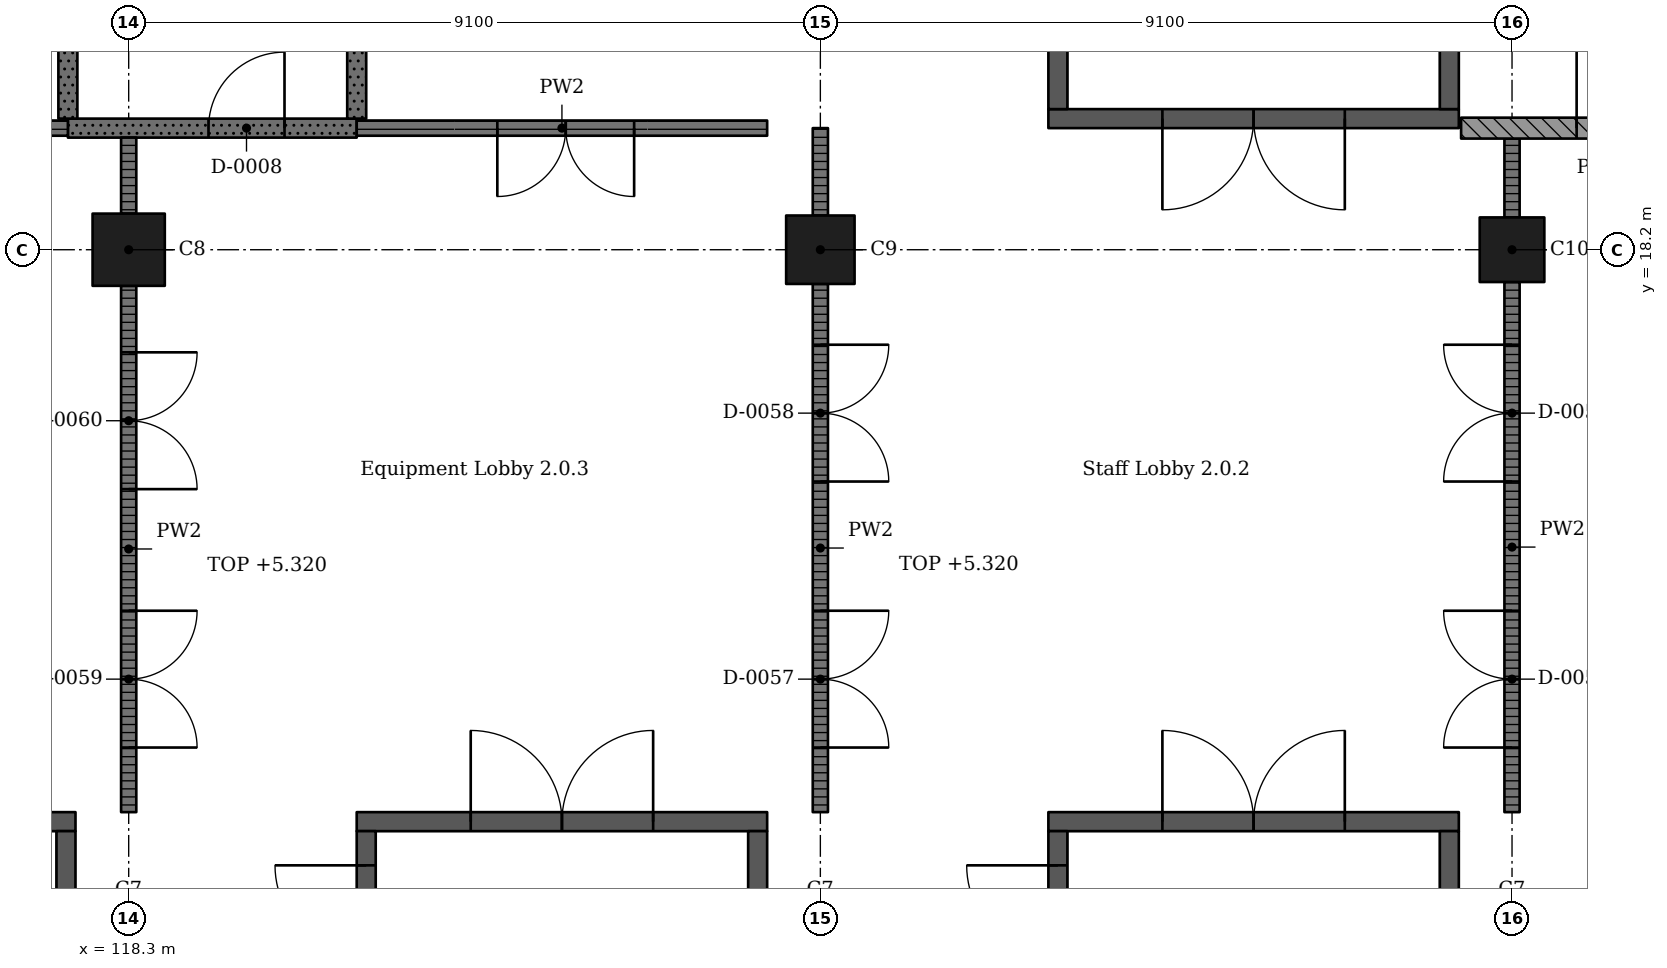
"""IFC4 building model, lengths in metres.
Left out: names, types, materials, properties, quantities, classifications, styles, units other than length and angle.
Written with IfcOpenShell. Run it as: python <this file> out.ifc"""

import sys

from ifc_helpers import new_model, si_unit, direction, frame, frame_2d, origin, origin_2d, place, context, subcontext, project, spatial, rectangle, extrude, element, fill, save


model = new_model("IFC4")
c1 = context("Model", 3, precision=1e-05, world=origin(), true_north=direction((0.0, 1.0)))
c2 = subcontext(c1, "Body", "Model", "MODEL_VIEW")
j1 = project(units=[si_unit("LENGTHUNIT", "METRE"), si_unit("PLANEANGLEUNIT", "RADIAN")], contexts=[c1])
p1 = place(None, origin())
s1 = spatial("IfcSite", under=j1, at=p1, CompositionType="ELEMENT")
p2 = place(p1, origin())
s2 = spatial("IfcBuilding", under=s1, at=p2, CompositionType="ELEMENT")
p3 = place(p2, origin())
s3 = spatial("IfcBuildingStorey", under=s2, at=p3, CompositionType="ELEMENT", Elevation=0.0)
p4 = place(p3, frame((118.3, 18.2, -0.4), z_axis=(0.0, 0.0, 1.0), x_axis=(1.0, 0.0, 0.0)))
e1 = element("IfcColumn", 1, at=p4, inside=s3, PredefinedType="COLUMN", context=c2, shape_type="SweptSolid", body=[
    extrude(rectangle(XDim=0.95, YDim=0.95, at=origin_2d()), origin(), (0.0, 0.0, 1.0), 6.77),
])
p5 = place(p3, frame((127.4, 18.2, -0.4), z_axis=(0.0, 0.0, 1.0), x_axis=(1.0, 0.0, 0.0)))
e2 = element("IfcColumn", 2, at=p5, inside=s3, PredefinedType="COLUMN", context=c2, shape_type="SweptSolid", body=[
    extrude(rectangle(XDim=0.9, YDim=0.9, at=origin_2d()), origin(), (0.0, 0.0, 1.0), 6.77),
])
p6 = place(p3, frame((136.5, 18.2, -0.4), z_axis=(0.0, 0.0, 1.0), x_axis=(1.0, 0.0, 0.0)))
e3 = element("IfcColumn", 3, at=p6, inside=s3, PredefinedType="COLUMN", context=c2, shape_type="SweptSolid", body=[
    extrude(rectangle(XDim=0.85, YDim=0.85, at=origin_2d()), origin(), (0.0, 0.0, 1.0), 6.77),
])
p7 = place(p3, frame((135.8, 10.675, -0.4), z_axis=(0.0, 0.0, 1.0), x_axis=(-1.0, 0.0, 0.0)))
e4 = element("IfcWall", 4, at=p7, inside=s3, PredefinedType="SHEAR", context=c2, shape_type="SweptSolid", body=[
    extrude(rectangle(XDim=5.4, YDim=0.25, at=frame_2d((2.7, 0.0))), origin(), (0.0, 0.0, 1.0), 6.77),
])
p8 = place(p7, frame((1.5, 0.0, 0.4)))
e5 = element("IfcOpeningElement", 5, at=p8, cuts=e4, PredefinedType="OPENING", context=c2, shape_type="SweptSolid", body=[
    extrude(rectangle(XDim=2.4, YDim=2.1, at=frame_2d((1.2, 1.05))), frame((0.0, 0.135, 0.0), z_axis=(0.0, -1.0, 0.0), x_axis=(1.0, 0.0, 0.0)), (0.0, 0.0, 1.0), 0.27),
])
p9 = place(p3, frame((130.525, 10.55, -0.4), z_axis=(0.0, 0.0, 1.0), x_axis=(0.0, -1.0, 0.0)))
e6 = element("IfcWall", 6, at=p9, inside=s3, PredefinedType="SHEAR", context=c2, shape_type="SweptSolid", body=[
    extrude(rectangle(XDim=9.6, YDim=0.25, at=frame_2d((4.8, 0.0))), origin(), (0.0, 0.0, 1.0), 6.77),
])
p10 = place(p9, frame((0.45, 0.0, 0.4)))
e7 = element("IfcOpeningElement", 7, at=p10, cuts=e6, PredefinedType="OPENING", context=c2, shape_type="SweptSolid", body=[
    extrude(rectangle(XDim=1.2, YDim=2.1, at=frame_2d((0.6, 1.05))), frame((0.0, 0.135, 0.0), z_axis=(0.0, -1.0, 0.0), x_axis=(1.0, 0.0, 0.0)), (0.0, 0.0, 1.0), 0.27),
])
p11 = place(p3, frame((135.675, 10.55, -0.4), z_axis=(0.0, 0.0, 1.0), x_axis=(0.0, -1.0, 0.0)))
e8 = element("IfcWall", 8, at=p11, inside=s3, PredefinedType="SHEAR", context=c2, shape_type="SweptSolid", body=[
    extrude(rectangle(XDim=9.6, YDim=0.25, at=frame_2d((4.8, 0.0))), origin(), (0.0, 0.0, 1.0), 6.77),
])
p12 = place(p3, frame((126.7, 10.675, -0.4), z_axis=(0.0, 0.0, 1.0), x_axis=(-1.0, 0.0, 0.0)))
e9 = element("IfcWall", 9, at=p12, inside=s3, PredefinedType="SHEAR", context=c2, shape_type="SweptSolid", body=[
    extrude(rectangle(XDim=5.4, YDim=0.25, at=frame_2d((2.7, 0.0))), origin(), (0.0, 0.0, 1.0), 6.77),
])
p13 = place(p12, frame((1.5, 0.0, 0.4)))
e10 = element("IfcOpeningElement", 10, at=p13, cuts=e9, PredefinedType="OPENING", context=c2, shape_type="SweptSolid", body=[
    extrude(rectangle(XDim=2.4, YDim=2.1, at=frame_2d((1.2, 1.05))), frame((0.0, 0.135, 0.0), z_axis=(0.0, -1.0, 0.0), x_axis=(1.0, 0.0, 0.0)), (0.0, 0.0, 1.0), 0.27),
])
p14 = place(p3, frame((121.425, 10.55, -0.4), z_axis=(0.0, 0.0, 1.0), x_axis=(0.0, -1.0, 0.0)))
e11 = element("IfcWall", 11, at=p14, inside=s3, PredefinedType="SHEAR", context=c2, shape_type="SweptSolid", body=[
    extrude(rectangle(XDim=9.6, YDim=0.25, at=frame_2d((4.8, 0.0))), origin(), (0.0, 0.0, 1.0), 6.77),
])
p15 = place(p14, frame((0.45, 0.0, 0.4)))
e12 = element("IfcOpeningElement", 12, at=p15, cuts=e11, PredefinedType="OPENING", context=c2, shape_type="SweptSolid", body=[
    extrude(rectangle(XDim=1.2, YDim=2.1, at=frame_2d((0.6, 1.05))), frame((0.0, 0.135, 0.0), z_axis=(0.0, -1.0, 0.0), x_axis=(1.0, 0.0, 0.0)), (0.0, 0.0, 1.0), 0.27),
])
p16 = place(p3, frame((126.575, 10.55, -0.4), z_axis=(0.0, 0.0, 1.0), x_axis=(0.0, -1.0, 0.0)))
e13 = element("IfcWall", 13, at=p16, inside=s3, PredefinedType="SHEAR", context=c2, shape_type="SweptSolid", body=[
    extrude(rectangle(XDim=9.6, YDim=0.25, at=frame_2d((4.8, 0.0))), origin(), (0.0, 0.0, 1.0), 6.77),
])
p17 = place(p3, frame((117.6, 10.675, -0.4), z_axis=(0.0, 0.0, 1.0), x_axis=(-1.0, 0.0, 0.0)))
e14 = element("IfcWall", 14, at=p17, inside=s3, PredefinedType="SHEAR", context=c2, shape_type="SweptSolid", body=[
    extrude(rectangle(XDim=5.4, YDim=0.25, at=frame_2d((2.7, 0.0))), origin(), (0.0, 0.0, 1.0), 6.77),
])
p18 = place(p17, frame((1.5, 0.0, 0.4)))
e15 = element("IfcOpeningElement", 15, at=p18, cuts=e14, PredefinedType="OPENING", context=c2, shape_type="SweptSolid", body=[
    extrude(rectangle(XDim=2.4, YDim=2.1, at=frame_2d((1.2, 1.05))), frame((0.0, 0.135, 0.0), z_axis=(0.0, -1.0, 0.0), x_axis=(1.0, 0.0, 0.0)), (0.0, 0.0, 1.0), 0.27),
])
p19 = place(p3, frame((117.475, 10.55, -0.4), z_axis=(0.0, 0.0, 1.0), x_axis=(0.0, -1.0, 0.0)))
e16 = element("IfcWall", 16, at=p19, inside=s3, PredefinedType="SHEAR", context=c2, shape_type="SweptSolid", body=[
    extrude(rectangle(XDim=9.6, YDim=0.25, at=frame_2d((4.8, 0.0))), origin(), (0.0, 0.0, 1.0), 6.77),
])
p20 = place(p3, frame((135.8, 19.925, -0.4), z_axis=(0.0, 0.0, 1.0), x_axis=(-1.0, 0.0, 0.0)))
e17 = element("IfcWall", 17, at=p20, inside=s3, PredefinedType="SHEAR", context=c2, shape_type="SweptSolid", body=[
    extrude(rectangle(XDim=5.4, YDim=0.25, at=frame_2d((2.7, 0.0))), origin(), (0.0, 0.0, 1.0), 6.77),
])
p21 = place(p20, frame((1.5, 0.0, 0.4)))
e18 = element("IfcOpeningElement", 18, at=p21, cuts=e17, PredefinedType="OPENING", context=c2, shape_type="SweptSolid", body=[
    extrude(rectangle(XDim=2.4, YDim=2.1, at=frame_2d((1.2, 1.05))), frame((0.0, 0.135, 0.0), z_axis=(0.0, -1.0, 0.0), x_axis=(1.0, 0.0, 0.0)), (0.0, 0.0, 1.0), 0.27),
])
for number, where, z_axis, x_axis in (
    (19, (130.525, 29.65, -0.4), (0.0, 0.0, 1.0), (0.0, -1.0, 0.0)),
    (20, (135.675, 29.65, -0.4), (0.0, 0.0, 1.0), (0.0, -1.0, 0.0)),
):
    element("IfcWall", number, at=place(p3, frame(where, z_axis=z_axis, x_axis=x_axis)), inside=s3, PredefinedType="SHEAR", context=c2, shape_type="SweptSolid", body=[
        extrude(rectangle(XDim=9.6, YDim=0.25, at=frame_2d((4.8, 0.0))), origin(), (0.0, 0.0, 1.0), 6.77),
    ])
p22 = place(p3, frame((112.2, 19.8, 0.0), z_axis=(0.0, 0.0, 1.0), x_axis=(1.0, 0.0, 0.0)))
e21 = element("IfcWall", 21, at=p22, inside=s3, PredefinedType="PARTITIONING", context=c2, shape_type="SweptSolid", body=[
    extrude(rectangle(XDim=5.3, YDim=0.2, at=frame_2d((2.65, 0.0))), origin(), (0.0, 0.0, 1.0), 6.02),
])
p23 = place(p22, frame((1.75, 0.0, 0.0)))
e22 = element("IfcOpeningElement", 22, at=p23, cuts=e21, PredefinedType="OPENING", context=c2, shape_type="SweptSolid", body=[
    extrude(rectangle(XDim=1.8, YDim=2.4, at=frame_2d((0.9, 1.2))), frame((0.0, 0.11, 0.0), z_axis=(0.0, -1.0, 0.0), x_axis=(1.0, 0.0, 0.0)), (0.0, 0.0, 1.0), 0.22),
])
p24 = place(p3, frame((117.5, 19.8, 0.0), z_axis=(0.0, 0.0, 1.0), x_axis=(1.0, 0.0, 0.0)))
e23 = element("IfcWall", 23, at=p24, inside=s3, PredefinedType="SOLIDWALL", context=c2, shape_type="SweptSolid", body=[
    extrude(rectangle(XDim=3.8, YDim=0.25, at=frame_2d((1.9, 0.0))), origin(), (0.0, 0.0, 1.0), 6.02),
])
p25 = place(p24, frame((1.85, 0.0, 0.0)))
e24 = element("IfcOpeningElement", 24, at=p25, cuts=e23, PredefinedType="OPENING", context=c2, shape_type="SweptSolid", body=[
    extrude(rectangle(XDim=1.0, YDim=2.1, at=frame_2d((0.5, 1.05))), frame((0.0, 0.135, 0.0), z_axis=(0.0, -1.0, 0.0), x_axis=(1.0, 0.0, 0.0)), (0.0, 0.0, 1.0), 0.27),
])
p26 = place(p3, frame((117.5, 19.925, 0.0), z_axis=(0.0, 0.0, 1.0), x_axis=(0.0, 1.0, 0.0)))
e25 = element("IfcWall", 25, at=p26, inside=s3, PredefinedType="SOLIDWALL", context=c2, shape_type="SweptSolid", body=[
    extrude(rectangle(XDim=2.845, YDim=0.25, at=frame_2d((1.422, 0.0))), origin(), (0.0, 0.0, 1.0), 6.02),
])
p27 = place(p3, frame((118.3, 10.8, 0.0), z_axis=(0.0, 0.0, 1.0), x_axis=(0.0, 1.0, 0.0)))
e26 = element("IfcWall", 26, at=p27, inside=s3, PredefinedType="PARTITIONING", context=c2, shape_type="SweptSolid", body=[
    extrude(rectangle(XDim=6.925, YDim=0.2, at=frame_2d((3.462, 0.0))), origin(), (0.0, 0.0, 1.0), 5.32),
])
p28 = place(p27, frame((0.85, 0.0, 0.0)))
e27 = element("IfcOpeningElement", 27, at=p28, cuts=e26, PredefinedType="OPENING", context=c2, shape_type="SweptSolid", body=[
    extrude(rectangle(XDim=1.8, YDim=2.4, at=frame_2d((0.9, 1.2))), frame((0.0, 0.11, 0.0), z_axis=(0.0, -1.0, 0.0), x_axis=(1.0, 0.0, 0.0)), (0.0, 0.0, 1.0), 0.22),
])
p29 = place(p27, frame((4.25, 0.0, 0.0)))
e28 = element("IfcOpeningElement", 28, at=p29, cuts=e26, PredefinedType="OPENING", context=c2, shape_type="SweptSolid", body=[
    extrude(rectangle(XDim=1.8, YDim=2.4, at=frame_2d((0.9, 1.2))), frame((0.0, 0.11, 0.0), z_axis=(0.0, -1.0, 0.0), x_axis=(1.0, 0.0, 0.0)), (0.0, 0.0, 1.0), 0.22),
])
p30 = place(p3, frame((118.3, 18.675, 0.0), z_axis=(0.0, 0.0, 1.0), x_axis=(0.0, 1.0, 0.0)))
e29 = element("IfcWall", 29, at=p30, inside=s3, PredefinedType="PARTITIONING", context=c2, shape_type="SweptSolid", body=[
    extrude(rectangle(XDim=1.0, YDim=0.2, at=frame_2d((0.5, 0.0))), origin(), (0.0, 0.0, 1.0), 5.32),
])
p31 = place(p3, frame((121.3, 19.8, 0.0), z_axis=(0.0, 0.0, 1.0), x_axis=(1.0, 0.0, 0.0)))
e30 = element("IfcWall", 30, at=p31, inside=s3, PredefinedType="PARTITIONING", context=c2, shape_type="SweptSolid", body=[
    extrude(rectangle(XDim=5.4, YDim=0.2, at=frame_2d((2.7, 0.0))), origin(), (0.0, 0.0, 1.0), 6.02),
])
p32 = place(p31, frame((1.85, 0.0, 0.0)))
e31 = element("IfcOpeningElement", 31, at=p32, cuts=e30, PredefinedType="OPENING", context=c2, shape_type="SweptSolid", body=[
    extrude(rectangle(XDim=1.8, YDim=2.4, at=frame_2d((0.9, 1.2))), frame((0.0, 0.11, 0.0), z_axis=(0.0, -1.0, 0.0), x_axis=(1.0, 0.0, 0.0)), (0.0, 0.0, 1.0), 0.22),
])
p33 = place(p3, frame((121.3, 19.925, 0.0), z_axis=(0.0, 0.0, 1.0), x_axis=(0.0, 1.0, 0.0)))
e32 = element("IfcWall", 32, at=p33, inside=s3, PredefinedType="SOLIDWALL", context=c2, shape_type="SweptSolid", body=[
    extrude(rectangle(XDim=6.945, YDim=0.25, at=frame_2d((3.473, 0.0))), origin(), (0.0, 0.0, 1.0), 6.02),
])
p34 = place(p3, frame((127.4, 10.8, 0.0), z_axis=(0.0, 0.0, 1.0), x_axis=(0.0, 1.0, 0.0)))
e33 = element("IfcWall", 33, at=p34, inside=s3, PredefinedType="PARTITIONING", context=c2, shape_type="SweptSolid", body=[
    extrude(rectangle(XDim=6.95, YDim=0.2, at=frame_2d((3.475, 0.0))), origin(), (0.0, 0.0, 1.0), 5.32),
])
p35 = place(p34, frame((0.85, 0.0, 0.0)))
e34 = element("IfcOpeningElement", 34, at=p35, cuts=e33, PredefinedType="OPENING", context=c2, shape_type="SweptSolid", body=[
    extrude(rectangle(XDim=1.8, YDim=2.4, at=frame_2d((0.9, 1.2))), frame((0.0, 0.11, 0.0), z_axis=(0.0, -1.0, 0.0), x_axis=(1.0, 0.0, 0.0)), (0.0, 0.0, 1.0), 0.22),
])
p36 = place(p34, frame((4.35, 0.0, 0.0)))
e35 = element("IfcOpeningElement", 35, at=p36, cuts=e33, PredefinedType="OPENING", context=c2, shape_type="SweptSolid", body=[
    extrude(rectangle(XDim=1.8, YDim=2.4, at=frame_2d((0.9, 1.2))), frame((0.0, 0.11, 0.0), z_axis=(0.0, -1.0, 0.0), x_axis=(1.0, 0.0, 0.0)), (0.0, 0.0, 1.0), 0.22),
])
p37 = place(p3, frame((127.4, 18.65, 0.0), z_axis=(0.0, 0.0, 1.0), x_axis=(0.0, 1.0, 0.0)))
e36 = element("IfcWall", 36, at=p37, inside=s3, PredefinedType="PARTITIONING", context=c2, shape_type="SweptSolid", body=[
    extrude(rectangle(XDim=1.15, YDim=0.2, at=frame_2d((0.575, 0.0))), origin(), (0.0, 0.0, 1.0), 5.32),
])
p38 = place(p3, frame((135.83, 19.8, 0.0), z_axis=(0.0, 0.0, 1.0), x_axis=(1.0, 0.0, 0.0)))
e37 = element("IfcWall", 37, at=p38, inside=s3, PredefinedType="SOLIDWALL", context=c2, shape_type="SweptSolid", body=[
    extrude(rectangle(XDim=3.64, YDim=0.275, at=frame_2d((1.82, 0.0))), origin(), (0.0, 0.0, 1.0), 6.02),
])
p39 = place(p38, frame((1.52, 0.0, 0.0)))
e38 = element("IfcOpeningElement", 38, at=p39, cuts=e37, PredefinedType="OPENING", context=c2, shape_type="SweptSolid", body=[
    extrude(rectangle(XDim=1.2, YDim=2.4, at=frame_2d((0.6, 1.2))), frame((0.0, 0.147, 0.0), z_axis=(0.0, -1.0, 0.0), x_axis=(1.0, 0.0, 0.0)), (0.0, 0.0, 1.0), 0.295),
])
p40 = place(p3, frame((136.5, 10.8, 0.0), z_axis=(0.0, 0.0, 1.0), x_axis=(0.0, 1.0, 0.0)))
e39 = element("IfcWall", 39, at=p40, inside=s3, PredefinedType="PARTITIONING", context=c2, shape_type="SweptSolid", body=[
    extrude(rectangle(XDim=6.975, YDim=0.2, at=frame_2d((3.487, 0.0))), origin(), (0.0, 0.0, 1.0), 5.32),
])
p41 = place(p40, frame((0.85, 0.0, 0.0)))
e40 = element("IfcOpeningElement", 40, at=p41, cuts=e39, PredefinedType="OPENING", context=c2, shape_type="SweptSolid", body=[
    extrude(rectangle(XDim=1.8, YDim=2.4, at=frame_2d((0.9, 1.2))), frame((0.0, 0.11, 0.0), z_axis=(0.0, -1.0, 0.0), x_axis=(1.0, 0.0, 0.0)), (0.0, 0.0, 1.0), 0.22),
])
p42 = place(p40, frame((4.35, 0.0, 0.0)))
e41 = element("IfcOpeningElement", 41, at=p42, cuts=e39, PredefinedType="OPENING", context=c2, shape_type="SweptSolid", body=[
    extrude(rectangle(XDim=1.8, YDim=2.4, at=frame_2d((0.9, 1.2))), frame((0.0, 0.11, 0.0), z_axis=(0.0, -1.0, 0.0), x_axis=(1.0, 0.0, 0.0)), (0.0, 0.0, 1.0), 0.22),
])
p43 = place(p3, frame((136.5, 18.625, 0.0), z_axis=(0.0, 0.0, 1.0), x_axis=(0.0, 1.0, 0.0)))
e42 = element("IfcWall", 42, at=p43, inside=s3, PredefinedType="PARTITIONING", context=c2, shape_type="SweptSolid", body=[
    extrude(rectangle(XDim=1.038, YDim=0.2, at=frame_2d((0.519, 0.0))), origin(), (0.0, 0.0, 1.0), 5.32),
])
p44 = place(p39, origin())
e43 = element("IfcDoor", 43, at=p44, inside=s3, OperationType="SINGLE_SWING_RIGHT", PredefinedType="DOOR", context=c2, shape_type="SweptSolid", body=[
    extrude(rectangle(XDim=1.2, YDim=2.4, at=frame_2d((0.6, 1.2))), frame((0.0, 0.025, 0.0), z_axis=(0.0, -1.0, 0.0), x_axis=(1.0, 0.0, 0.0)), (0.0, 0.0, 1.0), 0.05),
])
fill(e38, e43)
p45 = place(p25, origin())
e44 = element("IfcDoor", 44, at=p45, inside=s3, OperationType="SINGLE_SWING_LEFT", PredefinedType="DOOR", context=c2, shape_type="SweptSolid", body=[
    extrude(rectangle(XDim=1.0, YDim=2.1, at=frame_2d((0.5, 1.05))), frame((0.0, 0.025, 0.0), z_axis=(0.0, -1.0, 0.0), x_axis=(1.0, 0.0, 0.0)), (0.0, 0.0, 1.0), 0.05),
])
fill(e24, e44)
p46 = place(p41, origin())
e45 = element("IfcDoor", 45, at=p46, inside=s3, OperationType="DOUBLE_DOOR_SINGLE_SWING", PredefinedType="DOOR", context=c2, shape_type="SweptSolid", body=[
    extrude(rectangle(XDim=1.8, YDim=2.4, at=frame_2d((0.9, 1.2))), frame((0.0, 0.025, 0.0), z_axis=(0.0, -1.0, 0.0), x_axis=(1.0, 0.0, 0.0)), (0.0, 0.0, 1.0), 0.05),
])
fill(e40, e45)
p47 = place(p42, origin())
e46 = element("IfcDoor", 46, at=p47, inside=s3, OperationType="DOUBLE_DOOR_SINGLE_SWING", PredefinedType="DOOR", context=c2, shape_type="SweptSolid", body=[
    extrude(rectangle(XDim=1.8, YDim=2.4, at=frame_2d((0.9, 1.2))), frame((0.0, 0.025, 0.0), z_axis=(0.0, -1.0, 0.0), x_axis=(1.0, 0.0, 0.0)), (0.0, 0.0, 1.0), 0.05),
])
fill(e41, e46)
p48 = place(p35, origin())
e47 = element("IfcDoor", 47, at=p48, inside=s3, OperationType="DOUBLE_DOOR_SINGLE_SWING", PredefinedType="DOOR", context=c2, shape_type="SweptSolid", body=[
    extrude(rectangle(XDim=1.8, YDim=2.4, at=frame_2d((0.9, 1.2))), frame((0.0, 0.025, 0.0), z_axis=(0.0, -1.0, 0.0), x_axis=(1.0, 0.0, 0.0)), (0.0, 0.0, 1.0), 0.05),
])
fill(e34, e47)
p49 = place(p36, origin())
e48 = element("IfcDoor", 48, at=p49, inside=s3, OperationType="DOUBLE_DOOR_SINGLE_SWING", PredefinedType="DOOR", context=c2, shape_type="SweptSolid", body=[
    extrude(rectangle(XDim=1.8, YDim=2.4, at=frame_2d((0.9, 1.2))), frame((0.0, 0.025, 0.0), z_axis=(0.0, -1.0, 0.0), x_axis=(1.0, 0.0, 0.0)), (0.0, 0.0, 1.0), 0.05),
])
fill(e35, e48)
p50 = place(p28, origin())
e49 = element("IfcDoor", 49, at=p50, inside=s3, OperationType="DOUBLE_DOOR_SINGLE_SWING", PredefinedType="DOOR", context=c2, shape_type="SweptSolid", body=[
    extrude(rectangle(XDim=1.8, YDim=2.4, at=frame_2d((0.9, 1.2))), frame((0.0, 0.025, 0.0), z_axis=(0.0, -1.0, 0.0), x_axis=(1.0, 0.0, 0.0)), (0.0, 0.0, 1.0), 0.05),
])
fill(e27, e49)
p51 = place(p29, origin())
e50 = element("IfcDoor", 50, at=p51, inside=s3, OperationType="DOUBLE_DOOR_SINGLE_SWING", PredefinedType="DOOR", context=c2, shape_type="SweptSolid", body=[
    extrude(rectangle(XDim=1.8, YDim=2.4, at=frame_2d((0.9, 1.2))), frame((0.0, 0.025, 0.0), z_axis=(0.0, -1.0, 0.0), x_axis=(1.0, 0.0, 0.0)), (0.0, 0.0, 1.0), 0.05),
])
fill(e28, e50)
p52 = place(p32, origin())
e51 = element("IfcDoor", 51, at=p52, inside=s3, OperationType="DOUBLE_DOOR_SINGLE_SWING", PredefinedType="DOOR", context=c2, shape_type="SweptSolid", body=[
    extrude(rectangle(XDim=1.8, YDim=2.4, at=frame_2d((0.9, 1.2))), frame((0.0, 0.025, 0.0), z_axis=(0.0, -1.0, 0.0), x_axis=(1.0, 0.0, 0.0)), (0.0, 0.0, 1.0), 0.05),
])
fill(e31, e51)
p53 = place(p8, origin())
e52 = element("IfcDoor", 52, at=p53, inside=s3, OperationType="DOUBLE_DOOR_SINGLE_SWING", PredefinedType="DOOR", context=c2, shape_type="SweptSolid", body=[
    extrude(rectangle(XDim=2.4, YDim=2.1, at=frame_2d((1.2, 1.05))), frame((0.0, 0.025, 0.0), z_axis=(0.0, -1.0, 0.0), x_axis=(1.0, 0.0, 0.0)), (0.0, 0.0, 1.0), 0.05),
])
fill(e5, e52)
p54 = place(p13, origin())
e53 = element("IfcDoor", 53, at=p54, inside=s3, OperationType="DOUBLE_DOOR_SINGLE_SWING", PredefinedType="DOOR", context=c2, shape_type="SweptSolid", body=[
    extrude(rectangle(XDim=2.4, YDim=2.1, at=frame_2d((1.2, 1.05))), frame((0.0, 0.025, 0.0), z_axis=(0.0, -1.0, 0.0), x_axis=(1.0, 0.0, 0.0)), (0.0, 0.0, 1.0), 0.05),
])
fill(e10, e53)
p55 = place(p21, origin())
e54 = element("IfcDoor", 54, at=p55, inside=s3, OperationType="DOUBLE_DOOR_SINGLE_SWING", PredefinedType="DOOR", context=c2, shape_type="SweptSolid", body=[
    extrude(rectangle(XDim=2.4, YDim=2.1, at=frame_2d((1.2, 1.05))), frame((0.0, 0.025, 0.0), z_axis=(0.0, -1.0, 0.0), x_axis=(1.0, 0.0, 0.0)), (0.0, 0.0, 1.0), 0.05),
])
fill(e18, e54)
p56 = place(p10, origin())
e55 = element("IfcDoor", 55, at=p56, inside=s3, OperationType="SINGLE_SWING_LEFT", PredefinedType="DOOR", context=c2, shape_type="SweptSolid", body=[
    extrude(rectangle(XDim=1.2, YDim=2.1, at=frame_2d((0.6, 1.05))), frame((0.0, 0.025, 0.0), z_axis=(0.0, -1.0, 0.0), x_axis=(1.0, 0.0, 0.0)), (0.0, 0.0, 1.0), 0.05),
])
fill(e7, e55)
p57 = place(p15, origin())
e56 = element("IfcDoor", 56, at=p57, inside=s3, OperationType="SINGLE_SWING_LEFT", PredefinedType="DOOR", context=c2, shape_type="SweptSolid", body=[
    extrude(rectangle(XDim=1.2, YDim=2.1, at=frame_2d((0.6, 1.05))), frame((0.0, 0.025, 0.0), z_axis=(0.0, -1.0, 0.0), x_axis=(1.0, 0.0, 0.0)), (0.0, 0.0, 1.0), 0.05),
])
fill(e12, e56)
save(model, sys.argv[1])
